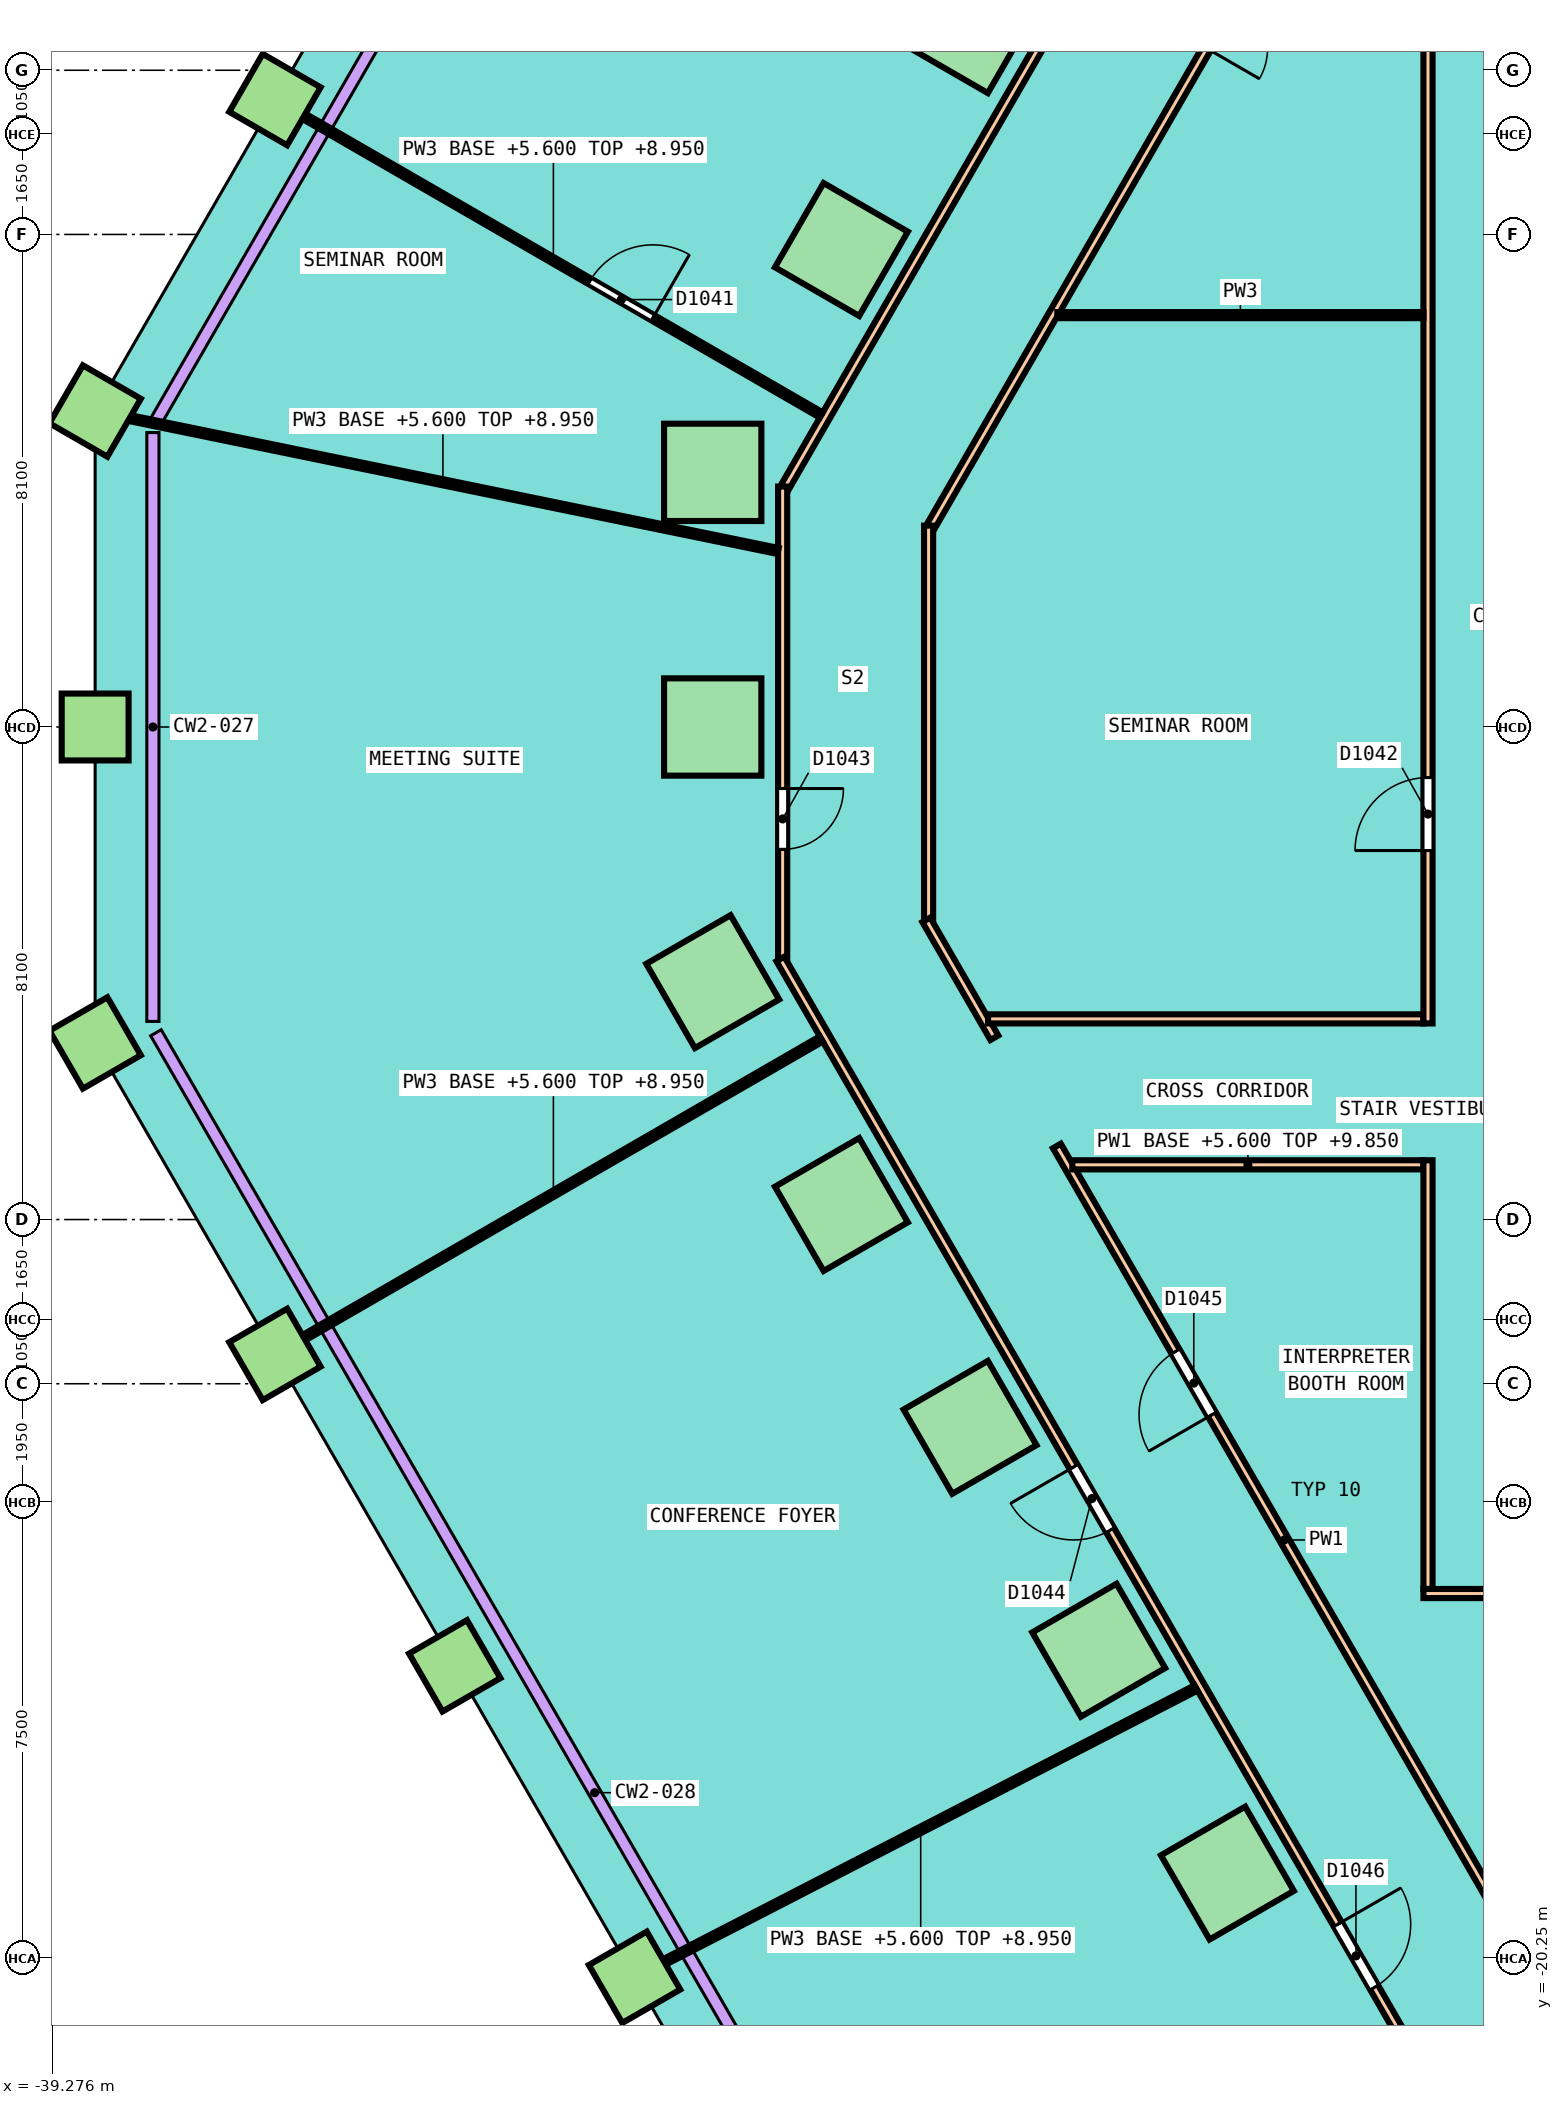
"""IFC4 building model, lengths in metres.
Left out: names, types, materials, properties, quantities, classifications, styles, units other than length and angle.
Written with IfcOpenShell. Run it as: python <this file> out.ifc"""

import sys

from ifc_helpers import new_model, si_unit, direction, frame, frame_2d, origin, origin_2d, place, context, subcontext, project, spatial, rectangle, extrude, element, fill, save


model = new_model("IFC4")
c1 = context("Model", 3, precision=1e-05, world=origin(), true_north=direction((0.0, 1.0)))
c2 = subcontext(c1, "Body", "Model", "MODEL_VIEW")
j1 = project(units=[si_unit("LENGTHUNIT", "METRE"), si_unit("PLANEANGLEUNIT", "RADIAN")], contexts=[c1])
p1 = place(None, origin())
s1 = spatial("IfcSite", under=j1, at=p1, CompositionType="ELEMENT")
p2 = place(p1, origin())
s2 = spatial("IfcBuilding", under=s1, at=p2, CompositionType="ELEMENT")
p3 = place(p2, frame((0.0, 0.0, 5.6)))
s3 = spatial("IfcBuildingStorey", under=s2, at=p3, CompositionType="ELEMENT", Elevation=5.6)
for number, where, z_axis, x_axis in (
    (1, (-24.181, 11.518, 0.0), (0.0, 0.0, 1.0), (-0.5, -0.866, 0.0)),
    (2, (-26.297, 7.853, 0.0), (0.0, 0.0, 1.0), (-0.5, -0.866, 0.0)),
    (3, (-28.413, 4.188, 0.0), (0.0, 0.0, 1.0), (0.0, -1.0, 0.0)),
    (4, (-28.413, 0.0, 0.0), (0.0, 0.0, 1.0), (0.0, -1.0, 0.0)),
    (5, (-28.413, -4.188, 0.0), (0.0, 0.0, 1.0), (0.5, -0.866, 0.0)),
    (6, (-26.297, -7.853, 0.0), (0.0, 0.0, 1.0), (0.5, -0.866, 0.0)),
    (7, (-24.181, -11.518, 0.0), (0.0, 0.0, 1.0), (0.5, -0.866, 0.0)),
    (8, (-22.065, -15.183, 0.0), (0.0, 0.0, 1.0), (0.5, -0.866, 0.0)),
    (9, (-19.949, -18.847, 0.0), (0.0, 0.0, 1.0), (0.5, -0.866, 0.0)),
):
    element("IfcColumn", number, at=place(p3, frame(where, z_axis=z_axis, x_axis=x_axis)), inside=s3, PredefinedType="COLUMN", context=c2, shape_type="SweptSolid", body=[
        extrude(rectangle(XDim=1.6, YDim=1.6, at=origin_2d()), origin(), (0.0, 0.0, 1.0), 4.25),
    ])
for number, where, z_axis, x_axis in (
    (10, (-35.612, 10.318, 0.0), (0.0, 0.0, 1.0), (-0.5, -0.866, 0.0)),
    (11, (-38.569, 5.196, 0.0), (0.0, 0.0, 1.0), (-0.5, -0.866, 0.0)),
    (12, (-38.569, 0.0, 0.0), (0.0, 0.0, 1.0), (0.0, -1.0, 0.0)),
    (13, (-38.569, -5.196, 0.0), (0.0, 0.0, 1.0), (0.5, -0.866, 0.0)),
    (14, (-35.612, -10.318, 0.0), (0.0, 0.0, 1.0), (0.5, -0.866, 0.0)),
    (15, (-32.656, -15.439, 0.0), (0.0, 0.0, 1.0), (0.5, -0.866, 0.0)),
    (16, (-29.698, -20.561, 0.0), (0.0, 0.0, 1.0), (0.5, -0.866, 0.0)),
):
    element("IfcColumn", number, at=place(p3, frame(where, z_axis=z_axis, x_axis=x_axis)), inside=s3, PredefinedType="COLUMN", context=c2, shape_type="SweptSolid", body=[
        extrude(rectangle(XDim=1.1, YDim=1.1, at=origin_2d()), origin(), (0.0, 0.0, 1.0), 4.25),
    ])
p4 = place(p3, frame((-24.825, 3.301, 0.0), z_axis=(0.0, 0.0, 1.0), x_axis=(0.499992422807, 0.866029778435, 0.0)))
e17 = element("IfcWall", 17, at=p4, inside=s3, PredefinedType="PARTITIONING", context=c2, shape_type="SweptSolid", body=[
    extrude(rectangle(XDim=19.257, YDim=0.15, at=frame_2d((9.628, 0.0))), origin(), (0.0, 0.0, 1.0), 3.2),
])
p5 = place(p4, frame((9.074, 0.0, 0.0)))
e18 = element("IfcOpeningElement", 18, at=p5, cuts=e17, PredefinedType="OPENING", context=c2, shape_type="SweptSolid", body=[
    extrude(rectangle(XDim=1.0, YDim=2.1, at=frame_2d((0.5, 1.05))), frame((0.0, 0.085, 0.0), z_axis=(0.0, -1.0, 0.0), x_axis=(1.0, 0.0, 0.0)), (0.0, 0.0, 1.0), 0.17),
])
p6 = place(p3, frame((-27.225, 3.944, 0.0), z_axis=(0.0, 0.0, 1.0), x_axis=(0.499997805905, 0.866026670542, 0.0)))
e19 = element("IfcWall", 19, at=p6, inside=s3, PredefinedType="PARTITIONING", context=c2, shape_type="SweptSolid", body=[
    extrude(rectangle(XDim=20.543, YDim=0.15, at=frame_2d((10.272, 0.0))), origin(), (0.0, 0.0, 1.0), 3.2),
])
p7 = place(p6, frame((13.746, 0.0, 0.0)))
e20 = element("IfcOpeningElement", 20, at=p7, cuts=e19, PredefinedType="OPENING", context=c2, shape_type="SweptSolid", body=[
    extrude(rectangle(XDim=1.2, YDim=2.1, at=frame_2d((0.6, 1.05))), frame((0.0, 0.085, 0.0), z_axis=(0.0, -1.0, 0.0), x_axis=(1.0, 0.0, 0.0)), (0.0, 0.0, 1.0), 0.17),
])
p8 = place(p3, frame((-27.263, -3.804, 0.0), z_axis=(0.0, 0.0, 1.0), x_axis=(0.0, 1.0, 0.0)))
e21 = element("IfcWall", 21, at=p8, inside=s3, PredefinedType="PARTITIONING", context=c2, shape_type="SweptSolid", body=[
    extrude(rectangle(XDim=7.759, YDim=0.15, at=frame_2d((3.879, 0.0))), origin(), (0.0, 0.0, 1.0), 3.2),
])
p9 = place(p8, frame((1.793, 0.0, 0.0)))
e22 = element("IfcOpeningElement", 22, at=p9, cuts=e21, PredefinedType="OPENING", context=c2, shape_type="SweptSolid", body=[
    extrude(rectangle(XDim=1.0, YDim=2.1, at=frame_2d((0.5, 1.05))), frame((0.0, 0.085, 0.0), z_axis=(0.0, -1.0, 0.0), x_axis=(1.0, 0.0, 0.0)), (0.0, 0.0, 1.0), 0.17),
])
p10 = place(p3, frame((-24.863, -3.161, 0.0), z_axis=(0.0, 0.0, 1.0), x_axis=(0.0, 1.0, 0.0)))
e23 = element("IfcWall", 23, at=p10, inside=s3, PredefinedType="PARTITIONING", context=c2, shape_type="SweptSolid", body=[
    extrude(rectangle(XDim=6.473, YDim=0.15, at=frame_2d((3.236, 0.0))), origin(), (0.0, 0.0, 1.0), 3.2),
])
p11 = place(p3, frame((-24.9, -3.171, 0.0), z_axis=(0.0, 0.0, 1.0), x_axis=(0.500021389451, -0.866013054227, 0.0)))
e24 = element("IfcWall", 24, at=p11, inside=s3, PredefinedType="PARTITIONING", context=c2, shape_type="SweptSolid", body=[
    extrude(rectangle(XDim=2.239, YDim=0.15, at=frame_2d((1.119, 0.0))), origin(), (0.0, 0.0, 1.0), 3.2),
])
p12 = place(p3, frame((-22.753, -6.89, 0.0), z_axis=(0.0, 0.0, 1.0), x_axis=(0.499997859304, -0.866026639712, 0.0)))
e25 = element("IfcWall", 25, at=p12, inside=s3, PredefinedType="PARTITIONING", context=c2, shape_type="SweptSolid", body=[
    extrude(rectangle(XDim=14.963, YDim=0.15, at=frame_2d((7.482, 0.0))), origin(), (0.0, 0.0, 1.0), 3.2),
])
p13 = place(p12, frame((3.903, 0.0, 0.0)))
e26 = element("IfcOpeningElement", 26, at=p13, cuts=e25, PredefinedType="OPENING", context=c2, shape_type="SweptSolid", body=[
    extrude(rectangle(XDim=1.2, YDim=2.1, at=frame_2d((0.6, 1.05))), frame((0.0, 0.085, 0.0), z_axis=(0.0, -1.0, 0.0), x_axis=(1.0, 0.0, 0.0)), (0.0, 0.0, 1.0), 0.17),
])
p14 = place(p3, frame((-27.3, -3.814, 0.0), z_axis=(0.0, 0.0, 1.0), x_axis=(0.499997805905, -0.866026670542, 0.0)))
e27 = element("IfcWall", 27, at=p14, inside=s3, PredefinedType="PARTITIONING", context=c2, shape_type="SweptSolid", body=[
    extrude(rectangle(XDim=20.543, YDim=0.15, at=frame_2d((10.272, 0.0))), origin(), (0.0, 0.0, 1.0), 3.2),
])
p15 = place(p14, frame((9.647, 0.0, 0.0)))
e28 = element("IfcOpeningElement", 28, at=p15, cuts=e27, PredefinedType="OPENING", context=c2, shape_type="SweptSolid", body=[
    extrude(rectangle(XDim=1.2, YDim=2.1, at=frame_2d((0.6, 1.05))), frame((0.0, 0.085, 0.0), z_axis=(0.0, -1.0, 0.0), x_axis=(1.0, 0.0, 0.0)), (0.0, 0.0, 1.0), 0.17),
])
p16 = place(p14, frame((18.331, 0.0, 0.0)))
e29 = element("IfcOpeningElement", 29, at=p16, cuts=e27, PredefinedType="OPENING", context=c2, shape_type="SweptSolid", body=[
    extrude(rectangle(XDim=1.2, YDim=2.1, at=frame_2d((0.6, 1.05))), frame((0.0, 0.085, 0.0), z_axis=(0.0, -1.0, 0.0), x_axis=(1.0, 0.0, 0.0)), (0.0, 0.0, 1.0), 0.17),
])
p17 = place(p3, frame((-23.885, -4.8, 0.0), z_axis=(0.0, 0.0, 1.0), x_axis=(1.0, 0.0, 0.0)))
e30 = element("IfcWall", 30, at=p17, inside=s3, PredefinedType="PARTITIONING", context=c2, shape_type="SweptSolid", body=[
    extrude(rectangle(XDim=7.16, YDim=0.15, at=frame_2d((3.58, 0.0))), origin(), (0.0, 0.0, 1.0), 3.2),
])
p18 = place(p3, frame((-22.5, -7.2, 0.0), z_axis=(0.0, 0.0, 1.0), x_axis=(1.0, 0.0, 0.0)))
e31 = element("IfcWall", 31, at=p18, inside=s3, PredefinedType="PARTITIONING", context=c2, shape_type="SweptSolid", body=[
    extrude(rectangle(XDim=5.774, YDim=0.15, at=frame_2d((2.887, 0.0))), origin(), (0.0, 0.0, 1.0), 4.25),
])
p19 = place(p3, frame((-16.65, -14.175, 0.0), z_axis=(0.0, 0.0, 1.0), x_axis=(0.0, 1.0, 0.0)))
e32 = element("IfcWall", 32, at=p19, inside=s3, PredefinedType="PARTITIONING", context=c2, shape_type="SweptSolid", body=[
    extrude(rectangle(XDim=7.05, YDim=0.15, at=frame_2d((3.525, 0.0))), origin(), (0.0, 0.0, 1.0), 3.2),
])
p20 = place(p3, frame((-16.65, -4.875, 0.0), z_axis=(0.0, 0.0, 1.0), x_axis=(0.0, 1.0, 0.0)))
e33 = element("IfcWall", 33, at=p20, inside=s3, PredefinedType="PARTITIONING", context=c2, shape_type="SweptSolid", body=[
    extrude(rectangle(XDim=19.2, YDim=0.15, at=frame_2d((9.6, 0.0))), origin(), (0.0, 0.0, 1.0), 3.2),
])
p21 = place(p20, frame((2.843, 0.0, 0.0)))
e34 = element("IfcOpeningElement", 34, at=p21, cuts=e33, PredefinedType="OPENING", context=c2, shape_type="SweptSolid", body=[
    extrude(rectangle(XDim=1.2, YDim=2.1, at=frame_2d((0.6, 1.05))), frame((0.0, 0.085, 0.0), z_axis=(0.0, -1.0, 0.0), x_axis=(1.0, 0.0, 0.0)), (0.0, 0.0, 1.0), 0.17),
])
p22 = place(p3, frame((-16.725, -14.25, 0.0), z_axis=(0.0, 0.0, 1.0), x_axis=(1.0, 0.0, 0.0)))
e35 = element("IfcWall", 35, at=p22, inside=s3, PredefinedType="PARTITIONING", context=c2, shape_type="SweptSolid", body=[
    extrude(rectangle(XDim=23.45, YDim=0.15, at=frame_2d((11.725, 0.0))), origin(), (0.0, 0.0, 1.0), 3.2),
])
p23 = place(p22, frame((9.677, 0.0, 0.0)))
e36 = element("IfcOpeningElement", 36, at=p23, cuts=e35, PredefinedType="OPENING", context=c2, shape_type="SweptSolid", body=[
    extrude(rectangle(XDim=1.0, YDim=2.1, at=frame_2d((0.5, 1.05))), frame((0.0, 0.085, 0.0), z_axis=(0.0, -1.0, 0.0), x_axis=(1.0, 0.0, 0.0)), (0.0, 0.0, 1.0), 0.17),
])
p24 = place(p3, frame((-35.439, -10.218, 0.0), z_axis=(0.0, 0.0, 1.0), x_axis=(0.86602416344, 0.500002148333, 0.0)))
e37 = element("IfcWall", 37, at=p24, inside=s3, PredefinedType="PARTITIONING", context=c2, shape_type="SweptSolid", body=[
    extrude(rectangle(XDim=10.175, YDim=0.1, at=frame_2d((5.088, 0.0))), origin(), (0.0, 0.0, 1.0), 3.35),
])
p25 = place(p3, frame((-22.746, 6.773, 0.0), z_axis=(0.0, 0.0, 1.0), x_axis=(1.0, 0.0, 0.0)))
e38 = element("IfcWall", 38, at=p25, inside=s3, PredefinedType="PARTITIONING", context=c2, shape_type="SweptSolid", body=[
    extrude(rectangle(XDim=6.021, YDim=0.1, at=frame_2d((3.01, 0.0))), origin(), (0.0, 0.0, 1.0), 3.2),
])
p26 = place(p3, frame((-35.439, 10.218, 0.0), z_axis=(0.0, 0.0, 1.0), x_axis=(0.86602416344, -0.500002148333, 0.0)))
e39 = element("IfcWall", 39, at=p26, inside=s3, PredefinedType="PARTITIONING", context=c2, shape_type="SweptSolid", body=[
    extrude(rectangle(XDim=10.175, YDim=0.1, at=frame_2d((5.088, 0.0))), origin(), (0.0, 0.0, 1.0), 3.35),
])
p27 = place(p26, frame((5.778, 0.0, 0.0)))
e40 = element("IfcOpeningElement", 40, at=p27, cuts=e39, PredefinedType="OPENING", context=c2, shape_type="SweptSolid", body=[
    extrude(rectangle(XDim=1.2, YDim=2.1, at=frame_2d((0.6, 1.05))), frame((0.0, 0.06, 0.0), z_axis=(0.0, -1.0, 0.0), x_axis=(1.0, 0.0, 0.0)), (0.0, 0.0, 1.0), 0.12),
])
p28 = place(p3, frame((-38.363, 5.154, 0.0), z_axis=(0.0, 0.0, 1.0), x_axis=(0.979647999814, -0.200723183666, 0.0)))
e41 = element("IfcWall", 41, at=p28, inside=s3, PredefinedType="PARTITIONING", context=c2, shape_type="SweptSolid", body=[
    extrude(rectangle(XDim=11.256, YDim=0.1, at=frame_2d((5.628, 0.0))), origin(), (0.0, 0.0, 1.0), 3.35),
])
p29 = place(p3, frame((-29.521, -20.469, 0.0), z_axis=(0.0, 0.0, 1.0), x_axis=(0.888930498325, 0.458042104122, 0.0)))
e42 = element("IfcWall", 42, at=p29, inside=s3, PredefinedType="PARTITIONING", context=c2, shape_type="SweptSolid", body=[
    extrude(rectangle(XDim=10.187, YDim=0.1, at=frame_2d((5.093, 0.0))), origin(), (0.0, 0.0, 1.0), 3.35),
])
p30 = place(p3, frame((-31.077, -18.173, 0.0), z_axis=(0.0, 0.0, 1.0), x_axis=(-0.866031096941, -0.499990139034, 0.0)))
e43 = element("IfcWall", 43, at=p30, inside=s3, PredefinedType="SOLIDWALL", context=c2, shape_type="SweptSolid", body=[
    extrude(rectangle(XDim=3.0, YDim=0.4, at=frame_2d((1.5, 0.0))), origin(), (0.0, 0.0, 1.0), 4.6),
])
for number, where, z_axis, x_axis in (
    (44, (-31.15, -18.446, 0.0), (0.0, 0.0, 1.0), (0.5, -0.866, 0.0)),
    (45, (-33.402, -19.746, 0.0), (0.0, 0.0, 1.0), (0.5, -0.866, 0.0)),
):
    element("IfcWall", number, at=place(p3, frame(where, z_axis=z_axis, x_axis=x_axis)), inside=s3, PredefinedType="SOLIDWALL", context=c2, shape_type="SweptSolid", body=[
        extrude(rectangle(XDim=13.2, YDim=0.4, at=frame_2d((6.6, 0.0))), origin(), (0.0, 0.0, 1.0), 4.6),
    ])
p31 = place(p3, frame((-31.277, -17.827, 0.0), z_axis=(0.0, 0.0, 1.0), x_axis=(-0.866031096941, -0.499990139034, 0.0)))
e46 = element("IfcWall", 46, at=p31, inside=s3, PredefinedType="SOLIDWALL", context=c2, shape_type="SweptSolid", body=[
    extrude(rectangle(XDim=3.0, YDim=0.4, at=frame_2d((1.5, 0.0))), origin(), (0.0, 0.0, 1.0), 4.6),
])
for number, where, z_axis, x_axis in (
    (47, (-33.875, -19.327, 0.0), (0.0, 0.0, 1.0), (-0.866, -0.5, 0.0)),
    (48, (-35.564, -20.302, 0.0), (0.0, 0.0, 1.0), (-0.866, -0.5, 0.0)),
):
    element("IfcWall", number, at=place(p3, frame(where, z_axis=z_axis, x_axis=x_axis)), inside=s3, PredefinedType="SOLIDWALL", context=c2, shape_type="SweptSolid", body=[
        extrude(rectangle(XDim=1.95, YDim=0.4, at=frame_2d((0.975, 0.0))), origin(), (0.0, 0.0, 1.0), 4.6),
    ])
p32 = place(p3, frame((-37.252, -21.277, 0.0), z_axis=(0.0, 0.0, 1.0), x_axis=(-0.866022959057, -0.500004234368, 0.0)))
e49 = element("IfcWall", 49, at=p32, inside=s3, PredefinedType="SOLIDWALL", context=c2, shape_type="SweptSolid", body=[
    extrude(rectangle(XDim=2.5, YDim=0.4, at=frame_2d((1.25, 0.0))), origin(), (0.0, 0.0, 1.0), 4.6),
])
p33 = place(p27, origin())
e50 = element("IfcDoor", 50, at=p33, inside=s3, OperationType="DOUBLE_DOOR_SINGLE_SWING", PredefinedType="DOOR", context=c2, shape_type="SweptSolid", body=[
    extrude(rectangle(XDim=1.2, YDim=2.1, at=frame_2d((0.6, 1.05))), frame((0.0, 0.025, 0.0), z_axis=(0.0, -1.0, 0.0), x_axis=(1.0, 0.0, 0.0)), (0.0, 0.0, 1.0), 0.05),
])
fill(e40, e50)
p34 = place(p21, origin())
e51 = element("IfcDoor", 51, at=p34, inside=s3, OperationType="DOUBLE_DOOR_SINGLE_SWING", PredefinedType="DOOR", context=c2, shape_type="SweptSolid", body=[
    extrude(rectangle(XDim=1.2, YDim=2.1, at=frame_2d((0.6, 1.05))), frame((0.0, 0.025, 0.0), z_axis=(0.0, -1.0, 0.0), x_axis=(1.0, 0.0, 0.0)), (0.0, 0.0, 1.0), 0.05),
])
fill(e34, e51)
p35 = place(p9, origin())
e52 = element("IfcDoor", 52, at=p35, inside=s3, OperationType="SINGLE_SWING_LEFT", PredefinedType="DOOR", context=c2, shape_type="SweptSolid", body=[
    extrude(rectangle(XDim=1.0, YDim=2.1, at=frame_2d((0.5, 1.05))), frame((0.0, 0.025, 0.0), z_axis=(0.0, -1.0, 0.0), x_axis=(1.0, 0.0, 0.0)), (0.0, 0.0, 1.0), 0.05),
])
fill(e22, e52)
p36 = place(p15, origin())
e53 = element("IfcDoor", 53, at=p36, inside=s3, OperationType="DOUBLE_DOOR_SINGLE_SWING", PredefinedType="DOOR", context=c2, shape_type="SweptSolid", body=[
    extrude(rectangle(XDim=1.2, YDim=2.1, at=frame_2d((0.6, 1.05))), frame((0.0, 0.025, 0.0), z_axis=(0.0, -1.0, 0.0), x_axis=(1.0, 0.0, 0.0)), (0.0, 0.0, 1.0), 0.05),
])
fill(e28, e53)
p37 = place(p13, origin())
e54 = element("IfcDoor", 54, at=p37, inside=s3, OperationType="DOUBLE_DOOR_SINGLE_SWING", PredefinedType="DOOR", context=c2, shape_type="SweptSolid", body=[
    extrude(rectangle(XDim=1.2, YDim=2.1, at=frame_2d((0.6, 1.05))), frame((0.0, 0.025, 0.0), z_axis=(0.0, -1.0, 0.0), x_axis=(1.0, 0.0, 0.0)), (0.0, 0.0, 1.0), 0.05),
])
fill(e26, e54)
p38 = place(p16, origin())
e55 = element("IfcDoor", 55, at=p38, inside=s3, OperationType="DOUBLE_DOOR_SINGLE_SWING", PredefinedType="DOOR", context=c2, shape_type="SweptSolid", body=[
    extrude(rectangle(XDim=1.2, YDim=2.1, at=frame_2d((0.6, 1.05))), frame((0.0, 0.025, 0.0), z_axis=(0.0, -1.0, 0.0), x_axis=(1.0, 0.0, 0.0)), (0.0, 0.0, 1.0), 0.05),
])
fill(e29, e55)
save(model, sys.argv[1])
